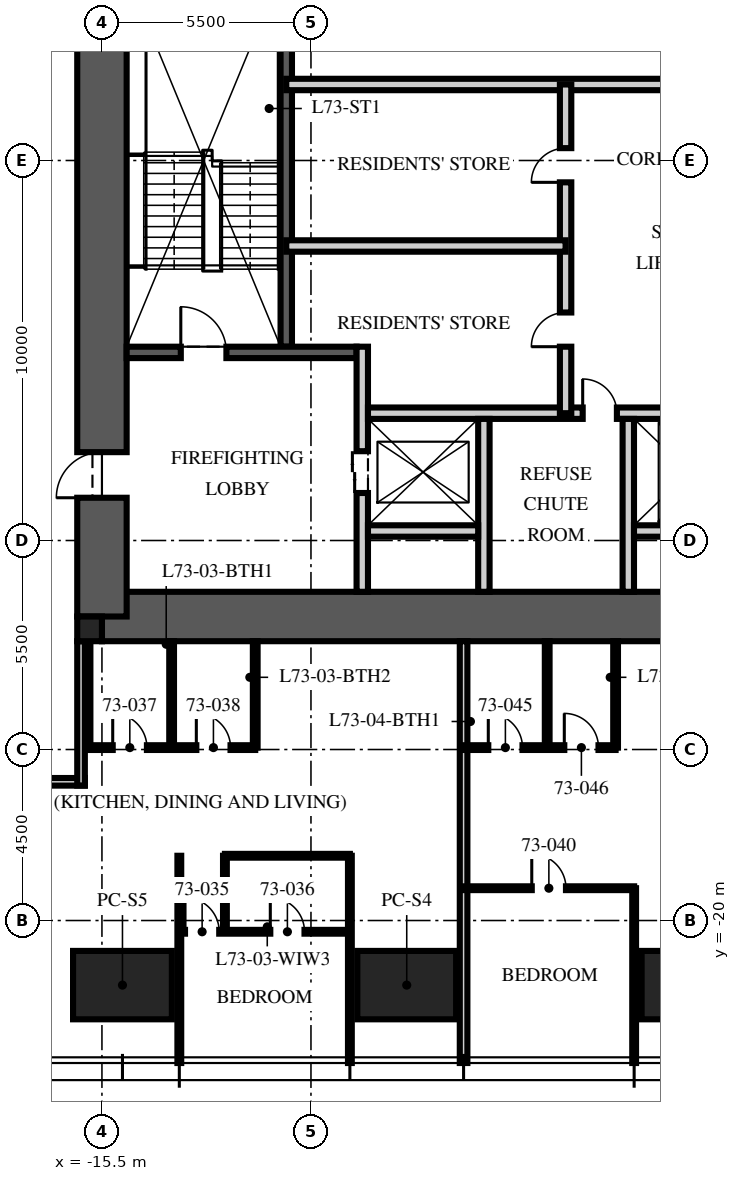
"""IFC4 building model, lengths in metres.
Left out: names, types, materials, properties, quantities, classifications, styles, units other than length and angle.
Written with IfcOpenShell. Run it as: python <this file> out.ifc"""

import sys

from ifc_helpers import new_model, si_unit, direction, frame, frame_2d, origin, origin_2d, place, context, subcontext, project, spatial, rectangle, extrude, element, fill, save


model = new_model("IFC4")
c1 = context("Model", 3, precision=1e-05, world=origin(), true_north=direction((0.0, 1.0)))
c2 = subcontext(c1, "Body", "Model", "MODEL_VIEW")
j1 = project(units=[si_unit("LENGTHUNIT", "METRE"), si_unit("PLANEANGLEUNIT", "RADIAN")], contexts=[c1])
p1 = place(None, origin())
s1 = spatial("IfcSite", under=j1, at=p1, CompositionType="ELEMENT")
p2 = place(p1, origin())
s2 = spatial("IfcBuilding", under=s1, at=p2, CompositionType="ELEMENT")
p3 = place(p2, frame((0.0, 0.0, 293.25)))
s3 = spatial("IfcBuildingStorey", under=s2, at=p3, CompositionType="ELEMENT", Elevation=293.25)
p4 = place(p3, frame((-15.5, -12.0, -0.25), z_axis=(0.0, 0.0, 1.0), x_axis=(1.0, 0.0, 0.0)))
e1 = element("IfcWall", 1, at=p4, inside=s3, PredefinedType="SHEAR", context=c2, shape_type="SweptSolid", body=[
    extrude(rectangle(XDim=31.0, YDim=1.3, at=frame_2d((15.5, 0.0))), origin(), (0.0, 0.0, 1.0), 3.75),
])
p5 = place(p3, frame((-15.5, -12.0, -0.25), z_axis=(0.0, 0.0, 1.0), x_axis=(0.0, 1.0, 0.0)))
e2 = element("IfcWall", 2, at=p5, inside=s3, PredefinedType="SHEAR", context=c2, shape_type="SweptSolid", body=[
    extrude(rectangle(XDim=24.0, YDim=1.3, at=frame_2d((12.0, 0.0))), origin(), (0.0, 0.0, 1.0), 3.75),
])
p6 = place(p5, frame((3.125, 0.0, 0.25)))
e3 = element("IfcOpeningElement", 3, at=p6, cuts=e2, PredefinedType="OPENING", context=c2, shape_type="SweptSolid", body=[
    extrude(rectangle(XDim=1.2, YDim=2.1, at=frame_2d((0.6, 1.05))), frame((0.0, 0.66, 0.0), z_axis=(0.0, -1.0, 0.0), x_axis=(1.0, 0.0, 0.0)), (0.0, 0.0, 1.0), 1.32),
])
p7 = place(p5, frame((19.375, 0.0, 0.25)))
e4 = element("IfcOpeningElement", 4, at=p7, cuts=e2, PredefinedType="OPENING", context=c2, shape_type="SweptSolid", body=[
    extrude(rectangle(XDim=1.8, YDim=2.1, at=frame_2d((0.9, 1.05))), frame((0.0, 0.66, 0.0), z_axis=(0.0, -1.0, 0.0), x_axis=(1.0, 0.0, 0.0)), (0.0, 0.0, 1.0), 1.32),
])
p8 = place(p3, frame((-15.825, -12.325, -0.25), z_axis=(0.0, 0.0, 1.0), x_axis=(1.0, 0.0, 0.0)))
e5 = element("IfcColumn", 5, at=p8, inside=s3, PredefinedType="COLUMN", context=c2, shape_type="SweptSolid", body=[
    extrude(rectangle(XDim=0.65, YDim=0.65, at=origin_2d()), origin(), (0.0, 0.0, 1.0), 3.75),
])
for number, where, z_axis, x_axis in (
    (6, (0.0, -21.7, 0.0), (0.0, 0.0, 1.0), (1.0, 0.0, 0.0)),
    (7, (-7.48, -21.7, 0.0), (0.0, 0.0, 1.0), (1.0, 0.0, 0.0)),
    (8, (-14.96, -21.7, 0.0), (0.0, 0.0, 1.0), (1.0, 0.0, 0.0)),
):
    element("IfcColumn", number, at=place(p3, frame(where, z_axis=z_axis, x_axis=x_axis)), inside=s3, PredefinedType="COLUMN", context=c2, shape_type="SweptSolid", body=[
        extrude(rectangle(XDim=2.6, YDim=1.8, at=origin_2d()), origin(), (0.0, 0.0, 1.0), 3.75),
    ])
p9 = place(p3, frame((-10.65, -4.9, 0.0), z_axis=(0.0, 0.0, 1.0), x_axis=(0.0, 1.0, 0.0)))
e9 = element("IfcWall", 9, at=p9, inside=s3, PredefinedType="SOLIDWALL", context=c2, shape_type="SweptSolid", body=[
    extrude(rectangle(XDim=10.1, YDim=0.3, at=frame_2d((5.05, 0.0))), origin(), (0.0, 0.0, 1.0), 3.5),
])
p10 = place(p3, frame((-14.85, -5.05, 0.0), z_axis=(0.0, 0.0, 1.0), x_axis=(1.0, 0.0, 0.0)))
e10 = element("IfcWall", 10, at=p10, inside=s3, PredefinedType="SOLIDWALL", context=c2, shape_type="SweptSolid", body=[
    extrude(rectangle(XDim=6.05, YDim=0.3, at=frame_2d((3.025, 0.0))), origin(), (0.0, 0.0, 1.0), 3.5),
])
p11 = place(p10, frame((1.425, 0.0, 0.0)))
e11 = element("IfcOpeningElement", 11, at=p11, cuts=e10, PredefinedType="OPENING", context=c2, shape_type="SweptSolid", body=[
    extrude(rectangle(XDim=1.2, YDim=2.1, at=frame_2d((0.6, 1.05))), frame((0.0, 0.16, 0.0), z_axis=(0.0, -1.0, 0.0), x_axis=(1.0, 0.0, 0.0)), (0.0, 0.0, 1.0), 0.32),
])
p12 = place(p3, frame((-8.65, -11.35, 0.0), z_axis=(0.0, 0.0, 1.0), x_axis=(0.0, 1.0, 0.0)))
e12 = element("IfcWall", 12, at=p12, inside=s3, PredefinedType="PARTITIONING", context=c2, shape_type="SweptSolid", body=[
    extrude(rectangle(XDim=6.45, YDim=0.3, at=frame_2d((3.225, 0.0))), origin(), (0.0, 0.0, 1.0), 3.5),
])
p13 = place(p12, frame((2.6, 0.0, 0.0)))
e13 = element("IfcOpeningElement", 13, at=p13, cuts=e12, PredefinedType="OPENING", context=c2, shape_type="SweptSolid", body=[
    extrude(rectangle(XDim=1.1, YDim=2.1, at=frame_2d((0.55, 1.05))), frame((0.0, 0.16, 0.0), z_axis=(0.0, -1.0, 0.0), x_axis=(1.0, 0.0, 0.0)), (0.0, 0.0, 1.0), 0.32),
])
p14 = place(p3, frame((-8.5, -6.65, 0.0), z_axis=(0.0, 0.0, 1.0), x_axis=(1.0, 0.0, 0.0)))
e14 = element("IfcWall", 14, at=p14, inside=s3, PredefinedType="PARTITIONING", context=c2, shape_type="SweptSolid", body=[
    extrude(rectangle(XDim=17.0, YDim=0.3, at=frame_2d((8.5, 0.0))), origin(), (0.0, 0.0, 1.0), 3.5),
])
p15 = place(p14, frame((7.8, 0.0, 0.0)))
e15 = element("IfcOpeningElement", 15, at=p15, cuts=e14, PredefinedType="OPENING", context=c2, shape_type="SweptSolid", body=[
    extrude(rectangle(XDim=1.3, YDim=2.4, at=frame_2d((0.65, 1.2))), frame((0.0, 0.16, 0.0), z_axis=(0.0, -1.0, 0.0), x_axis=(1.0, 0.0, 0.0)), (0.0, 0.0, 1.0), 0.32),
])
p16 = place(p14, frame((5.65, 0.0, 0.0)))
e16 = element("IfcOpeningElement", 16, at=p16, cuts=e14, PredefinedType="OPENING", context=c2, shape_type="SweptSolid", body=[
    extrude(rectangle(XDim=0.9, YDim=2.1, at=frame_2d((0.45, 1.05))), frame((0.0, 0.16, 0.0), z_axis=(0.0, -1.0, 0.0), x_axis=(1.0, 0.0, 0.0)), (0.0, 0.0, 1.0), 0.32),
])
p17 = place(p14, frame((10.4, 0.0, 0.0)))
e17 = element("IfcOpeningElement", 17, at=p17, cuts=e14, PredefinedType="OPENING", context=c2, shape_type="SweptSolid", body=[
    extrude(rectangle(XDim=0.9, YDim=2.1, at=frame_2d((0.45, 1.05))), frame((0.0, 0.16, 0.0), z_axis=(0.0, -1.0, 0.0), x_axis=(1.0, 0.0, 0.0)), (0.0, 0.0, 1.0), 0.32),
])
for number, where, z_axis, x_axis in (
    (18, (-5.45, -11.35, 0.0), (0.0, 0.0, 1.0), (0.0, 1.0, 0.0)),
    (19, (-1.65, -11.35, 0.0), (0.0, 0.0, 1.0), (0.0, 1.0, 0.0)),
):
    element("IfcWall", number, at=place(p3, frame(where, z_axis=z_axis, x_axis=x_axis)), inside=s3, PredefinedType="PARTITIONING", context=c2, shape_type="SweptSolid", body=[
        extrude(rectangle(XDim=4.55, YDim=0.3, at=frame_2d((2.275, 0.0))), origin(), (0.0, 0.0, 1.0), 3.5),
    ])
for number, where, z_axis, x_axis in (
    (20, (-8.5, -9.75, 0.0), (0.0, 0.0, 1.0), (1.0, 0.0, 0.0)),
    (21, (-1.5, -9.75, 0.0), (0.0, 0.0, 1.0), (1.0, 0.0, 0.0)),
):
    element("IfcWall", number, at=place(p3, frame(where, z_axis=z_axis, x_axis=x_axis)), inside=s3, PredefinedType="PARTITIONING", context=c2, shape_type="SweptSolid", body=[
        extrude(rectangle(XDim=2.9, YDim=0.3, at=frame_2d((1.45, 0.0))), origin(), (0.0, 0.0, 1.0), 3.5),
    ])
p18 = place(p3, frame((-10.65, 2.0, 0.0), z_axis=(0.0, 0.0, 1.0), x_axis=(1.0, 0.0, 0.0)))
e22 = element("IfcWall", 22, at=p18, inside=s3, PredefinedType="PARTITIONING", context=c2, shape_type="SweptSolid", body=[
    extrude(rectangle(XDim=21.3, YDim=0.3, at=frame_2d((10.65, 0.0))), origin(), (0.0, 0.0, 1.0), 3.5),
])
p19 = place(p18, frame((10.05, 0.0, 0.0)))
e23 = element("IfcOpeningElement", 23, at=p19, cuts=e22, PredefinedType="OPENING", context=c2, shape_type="SweptSolid", body=[
    extrude(rectangle(XDim=1.2, YDim=2.1, at=frame_2d((0.6, 1.05))), frame((0.0, 0.16, 0.0), z_axis=(0.0, -1.0, 0.0), x_axis=(1.0, 0.0, 0.0)), (0.0, 0.0, 1.0), 0.32),
])
p20 = place(p18, frame((18.942, 0.0, 0.0)))
e24 = element("IfcOpeningElement", 24, at=p20, cuts=e22, PredefinedType="OPENING", context=c2, shape_type="SweptSolid", body=[
    extrude(rectangle(XDim=0.9, YDim=2.1, at=frame_2d((0.45, 1.05))), frame((0.0, 0.16, 0.0), z_axis=(0.0, -1.0, 0.0), x_axis=(1.0, 0.0, 0.0)), (0.0, 0.0, 1.0), 0.32),
])
p21 = place(p3, frame((-3.3, -6.65, 0.0), z_axis=(0.0, 0.0, 1.0), x_axis=(0.0, 1.0, 0.0)))
e25 = element("IfcWall", 25, at=p21, inside=s3, PredefinedType="PARTITIONING", context=c2, shape_type="SweptSolid", body=[
    extrude(rectangle(XDim=8.65, YDim=0.3, at=frame_2d((4.325, 0.0))), origin(), (0.0, 0.0, 1.0), 3.5),
])
p22 = place(p21, frame((1.75, 0.0, 0.0)))
e26 = element("IfcOpeningElement", 26, at=p22, cuts=e25, PredefinedType="OPENING", context=c2, shape_type="SweptSolid", body=[
    extrude(rectangle(XDim=0.9, YDim=2.1, at=frame_2d((0.45, 1.05))), frame((0.0, 0.16, 0.0), z_axis=(0.0, -1.0, 0.0), x_axis=(1.0, 0.0, 0.0)), (0.0, 0.0, 1.0), 0.32),
])
p23 = place(p21, frame((6.075, 0.0, 0.0)))
e27 = element("IfcOpeningElement", 27, at=p23, cuts=e25, PredefinedType="OPENING", context=c2, shape_type="SweptSolid", body=[
    extrude(rectangle(XDim=0.9, YDim=2.1, at=frame_2d((0.45, 1.05))), frame((0.0, 0.16, 0.0), z_axis=(0.0, -1.0, 0.0), x_axis=(1.0, 0.0, 0.0)), (0.0, 0.0, 1.0), 0.32),
])
p24 = place(p3, frame((-10.65, -2.25, 0.0), z_axis=(0.0, 0.0, 1.0), x_axis=(1.0, 0.0, 0.0)))
e28 = element("IfcWall", 28, at=p24, inside=s3, PredefinedType="PARTITIONING", context=c2, shape_type="SweptSolid", body=[
    extrude(rectangle(XDim=7.35, YDim=0.3, at=frame_2d((3.675, 0.0))), origin(), (0.0, 0.0, 1.0), 3.5),
])
p25 = place(p3, frame((-19.15, -16.35, 0.0), z_axis=(0.0, 0.0, 1.0), x_axis=(1.0, 0.0, 0.0)))
e29 = element("IfcWall", 29, at=p25, inside=s3, PredefinedType="PARTITIONING", context=c2, shape_type="SweptSolid", body=[
    extrude(rectangle(XDim=3.2, YDim=0.2, at=frame_2d((1.6, 0.0))), origin(), (0.0, 0.0, 1.0), 2.6),
])
p26 = place(p3, frame((-16.05, -16.45, 0.0), z_axis=(0.0, 0.0, 1.0), x_axis=(0.0, 1.0, 0.0)))
e30 = element("IfcWall", 30, at=p26, inside=s3, PredefinedType="PARTITIONING", context=c2, shape_type="SweptSolid", body=[
    extrude(rectangle(XDim=3.8, YDim=0.2, at=frame_2d((1.9, 0.0))), origin(), (0.0, 0.0, 1.0), 2.6),
])
for number, where, z_axis, x_axis in (
    (31, (-13.464, -18.296, 0.0), (0.0, 0.0, 1.0), (0.0, -1.0, 0.0)),
    (32, (-8.976, -18.296, 0.0), (0.0, 0.0, 1.0), (0.0, -1.0, 0.0)),
):
    element("IfcWall", number, at=place(p3, frame(where, z_axis=z_axis, x_axis=x_axis)), inside=s3, PredefinedType="PARTITIONING", context=c2, shape_type="SweptSolid", body=[
        extrude(rectangle(XDim=5.454, YDim=0.1, at=frame_2d((2.727, 0.0))), origin(), (0.0, 0.0, 1.0), 3.01),
    ])
p27 = place(p3, frame((-5.984, -12.65, 0.0), z_axis=(0.0, 0.0, 1.0), x_axis=(0.0, -1.0, 0.0)))
e33 = element("IfcWall", 33, at=p27, inside=s3, PredefinedType="PARTITIONING", context=c2, shape_type="SweptSolid", body=[
    extrude(rectangle(XDim=11.1, YDim=0.2, at=frame_2d((5.55, 0.0))), origin(), (0.0, 0.0, 1.0), 3.01),
])
p28 = place(p3, frame((-1.496, -19.15, 0.0), z_axis=(0.0, 0.0, 1.0), x_axis=(0.0, -1.0, 0.0)))
e34 = element("IfcWall", 34, at=p28, inside=s3, PredefinedType="PARTITIONING", context=c2, shape_type="SweptSolid", body=[
    extrude(rectangle(XDim=4.6, YDim=0.1, at=frame_2d((2.3, 0.0))), origin(), (0.0, 0.0, 1.0), 3.01),
])
p29 = place(p3, frame((-13.464, -20.296, 0.0), z_axis=(0.0, 0.0, 1.0), x_axis=(1.0, 0.0, 0.0)))
e35 = element("IfcWall", 35, at=p29, inside=s3, PredefinedType="PARTITIONING", context=c2, shape_type="SweptSolid", body=[
    extrude(rectangle(XDim=4.488, YDim=0.1, at=frame_2d((2.244, 0.0))), origin(), (0.0, 0.0, 1.0), 2.91),
])
p30 = place(p29, frame((0.15, 0.0, 0.0)))
e36 = element("IfcOpeningElement", 36, at=p30, cuts=e35, PredefinedType="OPENING", context=c2, shape_type="SweptSolid", body=[
    extrude(rectangle(XDim=0.9, YDim=2.1, at=frame_2d((0.45, 1.05))), frame((0.0, 0.06, 0.0), z_axis=(0.0, -1.0, 0.0), x_axis=(1.0, 0.0, 0.0)), (0.0, 0.0, 1.0), 0.12),
])
p31 = place(p29, frame((2.394, 0.0, 0.0)))
e37 = element("IfcOpeningElement", 37, at=p31, cuts=e35, PredefinedType="OPENING", context=c2, shape_type="SweptSolid", body=[
    extrude(rectangle(XDim=0.9, YDim=2.1, at=frame_2d((0.45, 1.05))), frame((0.0, 0.06, 0.0), z_axis=(0.0, -1.0, 0.0), x_axis=(1.0, 0.0, 0.0)), (0.0, 0.0, 1.0), 0.12),
])
p32 = place(p3, frame((-12.264, -18.296, 0.0), z_axis=(0.0, 0.0, 1.0), x_axis=(0.0, -1.0, 0.0)))
e38 = element("IfcWall", 38, at=p32, inside=s3, PredefinedType="PARTITIONING", context=c2, shape_type="SweptSolid", body=[
    extrude(rectangle(XDim=2.0, YDim=0.1, at=frame_2d((1.0, 0.0))), origin(), (0.0, 0.0, 1.0), 3.5),
])
p33 = place(p3, frame((-12.264, -18.296, 0.0), z_axis=(0.0, 0.0, 1.0), x_axis=(1.0, 0.0, 0.0)))
e39 = element("IfcWall", 39, at=p33, inside=s3, PredefinedType="PARTITIONING", context=c2, shape_type="SweptSolid", body=[
    extrude(rectangle(XDim=3.288, YDim=0.1, at=frame_2d((1.644, 0.0))), origin(), (0.0, 0.0, 1.0), 2.91),
])
p34 = place(p3, frame((-15.866, -15.45, 0.0), z_axis=(0.0, 0.0, 1.0), x_axis=(1.0, 0.0, 0.0)))
e40 = element("IfcWall", 40, at=p34, inside=s3, PredefinedType="PARTITIONING", context=c2, shape_type="SweptSolid", body=[
    extrude(rectangle(XDim=4.4, YDim=0.125, at=frame_2d((2.2, 0.0))), origin(), (0.0, 0.0, 1.0), 2.9),
])
p35 = place(p34, frame((0.65, 0.0, 0.0)))
e41 = element("IfcOpeningElement", 41, at=p35, cuts=e40, PredefinedType="OPENING", context=c2, shape_type="SweptSolid", body=[
    extrude(rectangle(XDim=0.9, YDim=2.1, at=frame_2d((0.45, 1.05))), frame((0.0, 0.073, 0.0), z_axis=(0.0, -1.0, 0.0), x_axis=(1.0, 0.0, 0.0)), (0.0, 0.0, 1.0), 0.145),
])
p36 = place(p34, frame((2.85, 0.0, 0.0)))
e42 = element("IfcOpeningElement", 42, at=p36, cuts=e40, PredefinedType="OPENING", context=c2, shape_type="SweptSolid", body=[
    extrude(rectangle(XDim=0.9, YDim=2.1, at=frame_2d((0.45, 1.05))), frame((0.0, 0.073, 0.0), z_axis=(0.0, -1.0, 0.0), x_axis=(1.0, 0.0, 0.0)), (0.0, 0.0, 1.0), 0.145),
])
p37 = place(p3, frame((-15.866, -12.65, 0.0), z_axis=(0.0, 0.0, 1.0), x_axis=(0.0, -1.0, 0.0)))
e43 = element("IfcWall", 43, at=p37, inside=s3, PredefinedType="PARTITIONING", context=c2, shape_type="SweptSolid", body=[
    extrude(rectangle(XDim=2.8, YDim=0.125, at=frame_2d((1.4, 0.0))), origin(), (0.0, 0.0, 1.0), 2.6),
])
for number, where, z_axis, x_axis in (
    (44, (-13.667, -12.65, 0.0), (0.0, 0.0, 1.0), (0.0, -1.0, 0.0)),
    (45, (-11.467, -12.65, 0.0), (0.0, 0.0, 1.0), (0.0, -1.0, 0.0)),
):
    element("IfcWall", number, at=place(p3, frame(where, z_axis=z_axis, x_axis=x_axis)), inside=s3, PredefinedType="PARTITIONING", context=c2, shape_type="SweptSolid", body=[
        extrude(rectangle(XDim=2.8, YDim=0.125, at=frame_2d((1.4, 0.0))), origin(), (0.0, 0.0, 1.0), 3.5),
    ])
p38 = place(p3, frame((-5.984, -19.15, 0.0), z_axis=(0.0, 0.0, 1.0), x_axis=(1.0, 0.0, 0.0)))
e46 = element("IfcWall", 46, at=p38, inside=s3, PredefinedType="PARTITIONING", context=c2, shape_type="SweptSolid", body=[
    extrude(rectangle(XDim=4.488, YDim=0.1, at=frame_2d((2.244, 0.0))), origin(), (0.0, 0.0, 1.0), 2.91),
])
p39 = place(p38, frame((1.794, 0.0, 0.0)))
e47 = element("IfcOpeningElement", 47, at=p39, cuts=e46, PredefinedType="OPENING", context=c2, shape_type="SweptSolid", body=[
    extrude(rectangle(XDim=0.9, YDim=2.1, at=frame_2d((0.45, 1.05))), frame((0.0, 0.06, 0.0), z_axis=(0.0, -1.0, 0.0), x_axis=(1.0, 0.0, 0.0)), (0.0, 0.0, 1.0), 0.12),
])
p40 = place(p3, frame((-5.984, -15.45, 0.0), z_axis=(0.0, 0.0, 1.0), x_axis=(1.0, 0.0, 0.0)))
e48 = element("IfcWall", 48, at=p40, inside=s3, PredefinedType="PARTITIONING", context=c2, shape_type="SweptSolid", body=[
    extrude(rectangle(XDim=4.0, YDim=0.125, at=frame_2d((2.0, 0.0))), origin(), (0.0, 0.0, 1.0), 2.91),
])
p41 = place(p40, frame((0.65, 0.0, 0.0)))
e49 = element("IfcOpeningElement", 49, at=p41, cuts=e48, PredefinedType="OPENING", context=c2, shape_type="SweptSolid", body=[
    extrude(rectangle(XDim=0.9, YDim=2.1, at=frame_2d((0.45, 1.05))), frame((0.0, 0.073, 0.0), z_axis=(0.0, -1.0, 0.0), x_axis=(1.0, 0.0, 0.0)), (0.0, 0.0, 1.0), 0.145),
])
p42 = place(p40, frame((2.65, 0.0, 0.0)))
e50 = element("IfcOpeningElement", 50, at=p42, cuts=e48, PredefinedType="OPENING", context=c2, shape_type="SweptSolid", body=[
    extrude(rectangle(XDim=0.9, YDim=2.1, at=frame_2d((0.45, 1.05))), frame((0.0, 0.073, 0.0), z_axis=(0.0, -1.0, 0.0), x_axis=(1.0, 0.0, 0.0)), (0.0, 0.0, 1.0), 0.145),
])
p43 = place(p3, frame((-3.784, -12.65, 0.0), z_axis=(0.0, 0.0, 1.0), x_axis=(0.0, -1.0, 0.0)))
e51 = element("IfcWall", 51, at=p43, inside=s3, PredefinedType="PARTITIONING", context=c2, shape_type="SweptSolid", body=[
    extrude(rectangle(XDim=2.8, YDim=0.125, at=frame_2d((1.4, 0.0))), origin(), (0.0, 0.0, 1.0), 2.91),
])
p44 = place(p3, frame((-1.984, -12.65, 0.0), z_axis=(0.0, 0.0, 1.0), x_axis=(0.0, -1.0, 0.0)))
e52 = element("IfcWall", 52, at=p44, inside=s3, PredefinedType="PARTITIONING", context=c2, shape_type="SweptSolid", body=[
    extrude(rectangle(XDim=2.8, YDim=0.125, at=frame_2d((1.4, 0.0))), origin(), (0.0, 0.0, 1.0), 3.5),
])
p45 = place(p11, origin())
e53 = element("IfcDoor", 53, at=p45, inside=s3, OperationType="SINGLE_SWING_LEFT", PredefinedType="DOOR", context=c2, shape_type="SweptSolid", body=[
    extrude(rectangle(XDim=1.2, YDim=2.1, at=frame_2d((0.6, 1.05))), frame((0.0, 0.025, 0.0), z_axis=(0.0, -1.0, 0.0), x_axis=(1.0, 0.0, 0.0)), (0.0, 0.0, 1.0), 0.05),
])
fill(e11, e53)
p46 = place(p6, origin())
e54 = element("IfcDoor", 54, at=p46, inside=s3, OperationType="SINGLE_SWING_LEFT", PredefinedType="DOOR", context=c2, shape_type="SweptSolid", body=[
    extrude(rectangle(XDim=1.2, YDim=2.1, at=frame_2d((0.6, 1.05))), frame((0.0, 0.025, 0.0), z_axis=(0.0, -1.0, 0.0), x_axis=(1.0, 0.0, 0.0)), (0.0, 0.0, 1.0), 0.05),
])
fill(e3, e54)
p47 = place(p13, origin())
e55 = element("IfcDoor", 55, at=p47, inside=s3, OperationType="DOUBLE_DOOR_SLIDING", PredefinedType="DOOR", context=c2, shape_type="SweptSolid", body=[
    extrude(rectangle(XDim=1.1, YDim=2.1, at=frame_2d((0.55, 1.05))), frame((0.0, 0.025, 0.0), z_axis=(0.0, -1.0, 0.0), x_axis=(1.0, 0.0, 0.0)), (0.0, 0.0, 1.0), 0.05),
])
fill(e13, e55)
p48 = place(p16, origin())
e56 = element("IfcDoor", 56, at=p48, inside=s3, OperationType="SINGLE_SWING_LEFT", PredefinedType="DOOR", context=c2, shape_type="SweptSolid", body=[
    extrude(rectangle(XDim=0.9, YDim=2.1, at=frame_2d((0.45, 1.05))), frame((0.0, 0.025, 0.0), z_axis=(0.0, -1.0, 0.0), x_axis=(1.0, 0.0, 0.0)), (0.0, 0.0, 1.0), 0.05),
])
fill(e16, e56)
p49 = place(p22, origin())
e57 = element("IfcDoor", 57, at=p49, inside=s3, OperationType="SINGLE_SWING_LEFT", PredefinedType="DOOR", context=c2, shape_type="SweptSolid", body=[
    extrude(rectangle(XDim=0.9, YDim=2.1, at=frame_2d((0.45, 1.05))), frame((0.0, 0.025, 0.0), z_axis=(0.0, -1.0, 0.0), x_axis=(1.0, 0.0, 0.0)), (0.0, 0.0, 1.0), 0.05),
])
fill(e26, e57)
p50 = place(p23, origin())
e58 = element("IfcDoor", 58, at=p50, inside=s3, OperationType="SINGLE_SWING_LEFT", PredefinedType="DOOR", context=c2, shape_type="SweptSolid", body=[
    extrude(rectangle(XDim=0.9, YDim=2.1, at=frame_2d((0.45, 1.05))), frame((0.0, 0.025, 0.0), z_axis=(0.0, -1.0, 0.0), x_axis=(1.0, 0.0, 0.0)), (0.0, 0.0, 1.0), 0.05),
])
fill(e27, e58)
p51 = place(p30, origin())
e59 = element("IfcDoor", 59, at=p51, inside=s3, OperationType="SINGLE_SWING_LEFT", PredefinedType="DOOR", context=c2, shape_type="SweptSolid", body=[
    extrude(rectangle(XDim=0.9, YDim=2.1, at=frame_2d((0.45, 1.05))), frame((0.0, 0.025, 0.0), z_axis=(0.0, -1.0, 0.0), x_axis=(1.0, 0.0, 0.0)), (0.0, 0.0, 1.0), 0.05),
])
fill(e36, e59)
p52 = place(p31, origin())
e60 = element("IfcDoor", 60, at=p52, inside=s3, OperationType="SINGLE_SWING_LEFT", PredefinedType="DOOR", context=c2, shape_type="SweptSolid", body=[
    extrude(rectangle(XDim=0.9, YDim=2.1, at=frame_2d((0.45, 1.05))), frame((0.0, 0.025, 0.0), z_axis=(0.0, -1.0, 0.0), x_axis=(1.0, 0.0, 0.0)), (0.0, 0.0, 1.0), 0.05),
])
fill(e37, e60)
p53 = place(p35, origin())
e61 = element("IfcDoor", 61, at=p53, inside=s3, OperationType="SINGLE_SWING_LEFT", PredefinedType="DOOR", context=c2, shape_type="SweptSolid", body=[
    extrude(rectangle(XDim=0.9, YDim=2.1, at=frame_2d((0.45, 1.05))), frame((0.0, 0.025, 0.0), z_axis=(0.0, -1.0, 0.0), x_axis=(1.0, 0.0, 0.0)), (0.0, 0.0, 1.0), 0.05),
])
fill(e41, e61)
p54 = place(p36, origin())
e62 = element("IfcDoor", 62, at=p54, inside=s3, OperationType="SINGLE_SWING_LEFT", PredefinedType="DOOR", context=c2, shape_type="SweptSolid", body=[
    extrude(rectangle(XDim=0.9, YDim=2.1, at=frame_2d((0.45, 1.05))), frame((0.0, 0.025, 0.0), z_axis=(0.0, -1.0, 0.0), x_axis=(1.0, 0.0, 0.0)), (0.0, 0.0, 1.0), 0.05),
])
fill(e42, e62)
p55 = place(p39, origin())
e63 = element("IfcDoor", 63, at=p55, inside=s3, OperationType="SINGLE_SWING_LEFT", PredefinedType="DOOR", context=c2, shape_type="SweptSolid", body=[
    extrude(rectangle(XDim=0.9, YDim=2.1, at=frame_2d((0.45, 1.05))), frame((0.0, 0.025, 0.0), z_axis=(0.0, -1.0, 0.0), x_axis=(1.0, 0.0, 0.0)), (0.0, 0.0, 1.0), 0.05),
])
fill(e47, e63)
p56 = place(p41, origin())
e64 = element("IfcDoor", 64, at=p56, inside=s3, OperationType="SINGLE_SWING_LEFT", PredefinedType="DOOR", context=c2, shape_type="SweptSolid", body=[
    extrude(rectangle(XDim=0.9, YDim=2.1, at=frame_2d((0.45, 1.05))), frame((0.0, 0.025, 0.0), z_axis=(0.0, -1.0, 0.0), x_axis=(1.0, 0.0, 0.0)), (0.0, 0.0, 1.0), 0.05),
])
fill(e49, e64)
p57 = place(p42, origin())
e65 = element("IfcDoor", 65, at=p57, inside=s3, OperationType="SINGLE_SWING_LEFT", PredefinedType="DOOR", context=c2, shape_type="SweptSolid", body=[
    extrude(rectangle(XDim=0.9, YDim=2.1, at=frame_2d((0.45, 1.05))), frame((0.0, 0.025, 0.0), z_axis=(0.0, -1.0, 0.0), x_axis=(1.0, 0.0, 0.0)), (0.0, 0.0, 1.0), 0.05),
])
fill(e50, e65)
save(model, sys.argv[1])
